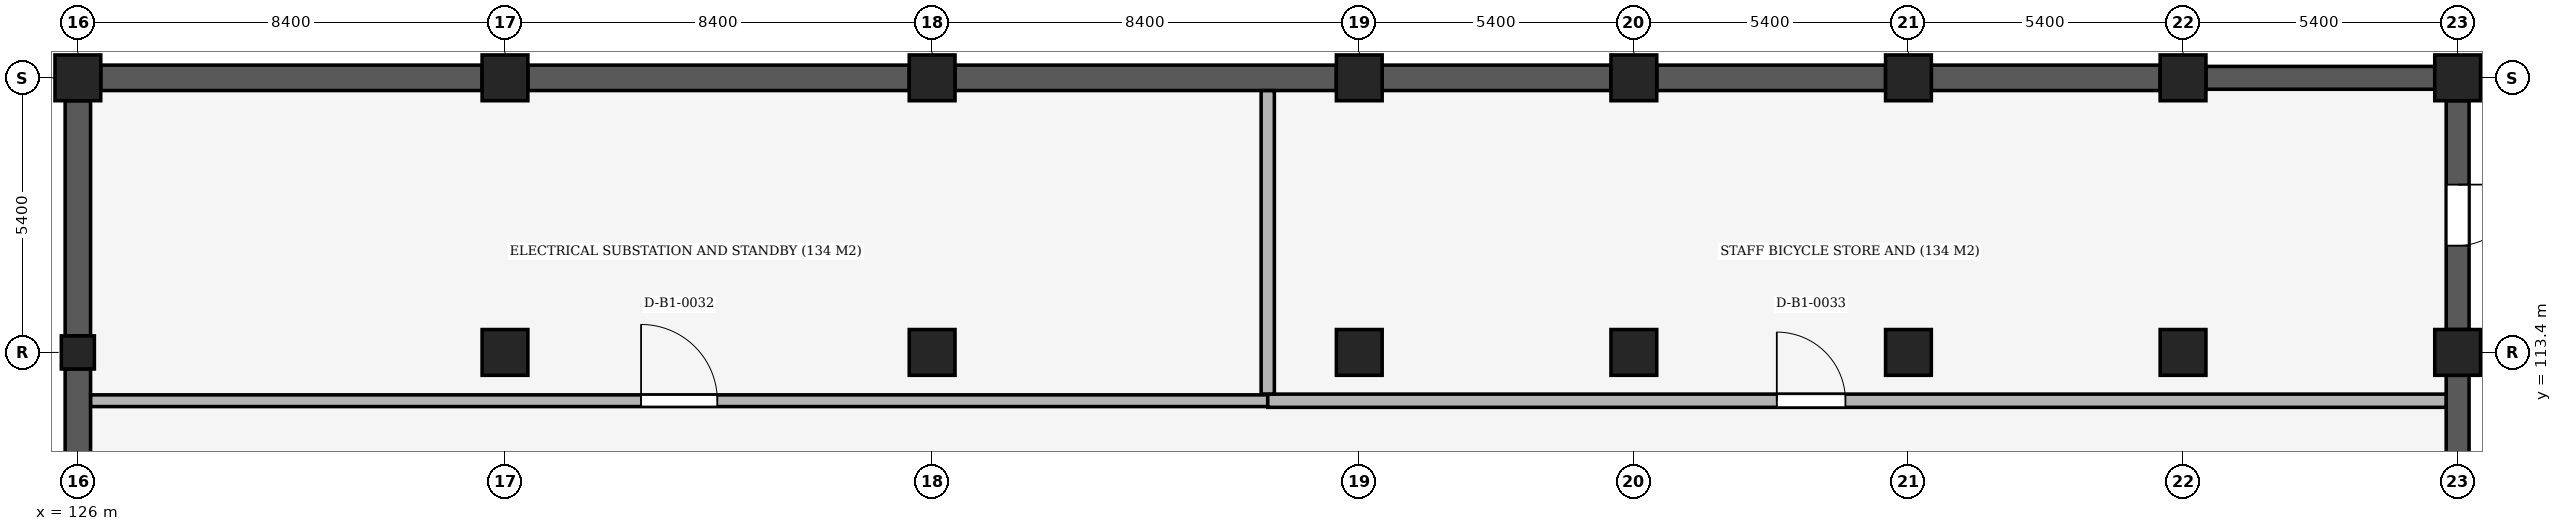
"""IFC4 building model, lengths in metres.
Left out: names, types, materials, properties, quantities, classifications, styles, units other than length and angle.
Written with IfcOpenShell. Run it as: python <this file> out.ifc"""

import sys

from ifc_helpers import new_model, si_unit, direction, frame, frame_2d, origin, origin_2d, place, context, subcontext, project, spatial, rectangle, extrude, element, fill, save


model = new_model("IFC4")
c1 = context("Model", 3, precision=1e-05, world=origin(), true_north=direction((0.0, 1.0)))
c2 = subcontext(c1, "Body", "Model", "MODEL_VIEW")
j1 = project(units=[si_unit("LENGTHUNIT", "METRE"), si_unit("PLANEANGLEUNIT", "RADIAN")], contexts=[c1])
p1 = place(None, origin())
s1 = spatial("IfcSite", under=j1, at=p1, CompositionType="ELEMENT")
p2 = place(p1, origin())
s2 = spatial("IfcBuilding", under=s1, at=p2, CompositionType="ELEMENT")
p3 = place(p2, frame((0.0, 0.0, -4.8)))
s3 = spatial("IfcBuildingStorey", under=s2, at=p3, CompositionType="ELEMENT", Elevation=-4.8)
p4 = place(p3, frame((126.0, 113.4, 0.0), z_axis=(0.0, 0.0, 1.0), x_axis=(1.0, 0.0, 0.0)))
e1 = element("IfcColumn", 1, at=p4, inside=s3, PredefinedType="COLUMN", context=c2, shape_type="SweptSolid", body=[
    extrude(rectangle(XDim=0.65, YDim=0.65, at=origin_2d()), origin(), (0.0, 0.0, 1.0), 4.8),
])
for number, where, z_axis, x_axis in (
    (2, (126.0, 118.8, 0.0), (0.0, 0.0, 1.0), (1.0, 0.0, 0.0)),
    (3, (134.4, 113.4, 0.0), (0.0, 0.0, 1.0), (1.0, 0.0, 0.0)),
    (4, (134.4, 118.8, 0.0), (0.0, 0.0, 1.0), (1.0, 0.0, 0.0)),
    (5, (142.8, 113.4, 0.0), (0.0, 0.0, 1.0), (1.0, 0.0, 0.0)),
    (6, (142.8, 118.8, 0.0), (0.0, 0.0, 1.0), (1.0, 0.0, 0.0)),
    (7, (151.2, 113.4, 0.0), (0.0, 0.0, 1.0), (1.0, 0.0, 0.0)),
    (8, (151.2, 118.8, 0.0), (0.0, 0.0, 1.0), (1.0, 0.0, 0.0)),
    (9, (156.6, 113.4, 0.0), (0.0, 0.0, 1.0), (1.0, 0.0, 0.0)),
    (10, (156.6, 118.8, 0.0), (0.0, 0.0, 1.0), (1.0, 0.0, 0.0)),
    (11, (162.0, 113.4, 0.0), (0.0, 0.0, 1.0), (1.0, 0.0, 0.0)),
    (12, (162.0, 118.8, 0.0), (0.0, 0.0, 1.0), (1.0, 0.0, 0.0)),
    (13, (167.4, 113.4, 0.0), (0.0, 0.0, 1.0), (1.0, 0.0, 0.0)),
    (14, (167.4, 118.8, 0.0), (0.0, 0.0, 1.0), (1.0, 0.0, 0.0)),
    (15, (172.8, 113.4, 0.0), (0.0, 0.0, 1.0), (1.0, 0.0, 0.0)),
    (16, (172.8, 118.8, 0.0), (0.0, 0.0, 1.0), (1.0, 0.0, 0.0)),
):
    element("IfcColumn", number, at=place(p3, frame(where, z_axis=z_axis, x_axis=x_axis)), inside=s3, PredefinedType="COLUMN", context=c2, shape_type="SweptSolid", body=[
        extrude(rectangle(XDim=0.9, YDim=0.9, at=origin_2d()), origin(), (0.0, 0.0, 1.0), 4.8),
    ])
p5 = place(p3, frame((126.0, 108.325, 0.0), z_axis=(0.0, 0.0, 1.0), x_axis=(0.0, 1.0, 0.0)))
e17 = element("IfcWall", 17, at=p5, inside=s3, PredefinedType="USERDEFINED", context=c2, shape_type="SweptSolid", body=[
    extrude(rectangle(XDim=4.75, YDim=0.5, at=frame_2d((2.375, 0.0))), origin(), (0.0, 0.0, 1.0), 3.85),
])
p6 = place(p3, frame((126.0, 113.725, 0.0), z_axis=(0.0, 0.0, 1.0), x_axis=(0.0, 1.0, 0.0)))
e18 = element("IfcWall", 18, at=p6, inside=s3, PredefinedType="USERDEFINED", context=c2, shape_type="SweptSolid", body=[
    extrude(rectangle(XDim=4.625, YDim=0.5, at=frame_2d((2.312, 0.0))), origin(), (0.0, 0.0, 1.0), 3.85),
])
for number, where, z_axis, x_axis in (
    (19, (126.45, 118.8, 0.0), (0.0, 0.0, 1.0), (1.0, 0.0, 0.0)),
    (20, (134.85, 118.8, 0.0), (0.0, 0.0, 1.0), (1.0, 0.0, 0.0)),
    (21, (143.25, 118.8, 0.0), (0.0, 0.0, 1.0), (1.0, 0.0, 0.0)),
):
    element("IfcWall", number, at=place(p3, frame(where, z_axis=z_axis, x_axis=x_axis)), inside=s3, PredefinedType="USERDEFINED", context=c2, shape_type="SweptSolid", body=[
        extrude(rectangle(XDim=7.5, YDim=0.5, at=frame_2d((3.75, 0.0))), origin(), (0.0, 0.0, 1.0), 3.8),
    ])
for number, where, z_axis, x_axis in (
    (22, (151.65, 118.8, 0.0), (0.0, 0.0, 1.0), (1.0, 0.0, 0.0)),
    (23, (157.05, 118.8, 0.0), (0.0, 0.0, 1.0), (1.0, 0.0, 0.0)),
    (24, (162.45, 118.8, 0.0), (0.0, 0.0, 1.0), (1.0, 0.0, 0.0)),
):
    element("IfcWall", number, at=place(p3, frame(where, z_axis=z_axis, x_axis=x_axis)), inside=s3, PredefinedType="USERDEFINED", context=c2, shape_type="SweptSolid", body=[
        extrude(rectangle(XDim=4.5, YDim=0.5, at=frame_2d((2.25, 0.0))), origin(), (0.0, 0.0, 1.0), 3.9),
    ])
p7 = place(p3, frame((167.85, 118.8, 0.0), z_axis=(0.0, 0.0, 1.0), x_axis=(1.0, 0.0, 0.0)))
e25 = element("IfcWall", 25, at=p7, inside=s3, PredefinedType="USERDEFINED", context=c2, shape_type="SweptSolid", body=[
    extrude(rectangle(XDim=4.5, YDim=0.45, at=frame_2d((2.25, 0.0))), origin(), (0.0, 0.0, 1.0), 3.9),
])
p8 = place(p3, frame((172.8, 118.35, 0.0), z_axis=(0.0, 0.0, 1.0), x_axis=(0.0, -1.0, 0.0)))
e26 = element("IfcWall", 26, at=p8, inside=s3, PredefinedType="USERDEFINED", context=c2, shape_type="SweptSolid", body=[
    extrude(rectangle(XDim=4.5, YDim=0.45, at=frame_2d((2.25, 0.0))), origin(), (0.0, 0.0, 1.0), 3.85),
])
p9 = place(p8, frame((1.65, 0.0, 0.0)))
e27 = element("IfcOpeningElement", 27, at=p9, cuts=e26, PredefinedType="OPENING", context=c2, shape_type="SweptSolid", body=[
    extrude(rectangle(XDim=1.2, YDim=2.2, at=frame_2d((0.6, 1.1))), frame((0.0, 0.24, 0.0), z_axis=(0.0, -1.0, 0.0), x_axis=(1.0, 0.0, 0.0)), (0.0, 0.0, 1.0), 0.48),
])
p10 = place(p3, frame((172.8, 112.95, 0.0), z_axis=(0.0, 0.0, 1.0), x_axis=(0.0, -1.0, 0.0)))
e28 = element("IfcWall", 28, at=p10, inside=s3, PredefinedType="USERDEFINED", context=c2, shape_type="SweptSolid", body=[
    extrude(rectangle(XDim=4.5, YDim=0.45, at=frame_2d((2.25, 0.0))), origin(), (0.0, 0.0, 1.0), 3.85),
])
p11 = place(p3, frame((126.252, 112.45, 0.0), z_axis=(0.0, 0.0, 1.0), x_axis=(1.0, 0.0, 0.0)))
e29 = element("IfcWall", 29, at=p11, inside=s3, PredefinedType="SOLIDWALL", context=c2, shape_type="SweptSolid", body=[
    extrude(rectangle(XDim=23.148, YDim=0.23, at=frame_2d((11.574, 0.0))), origin(), (0.0, 0.0, 1.0), 3.85),
])
p12 = place(p11, frame((10.824, 0.0, 0.0)))
e30 = element("IfcOpeningElement", 30, at=p12, cuts=e29, PredefinedType="OPENING", context=c2, shape_type="SweptSolid", body=[
    extrude(rectangle(XDim=1.5, YDim=2.2, at=frame_2d((0.75, 1.1))), frame((0.0, 0.13, 0.0), z_axis=(0.0, -1.0, 0.0), x_axis=(1.0, 0.0, 0.0)), (0.0, 0.0, 1.0), 0.26),
])
p13 = place(p3, frame((149.4, 112.45, 0.0), z_axis=(0.0, 0.0, 1.0), x_axis=(1.0, 0.0, 0.0)))
e31 = element("IfcWall", 31, at=p13, inside=s3, PredefinedType="PARTITIONING", context=c2, shape_type="SweptSolid", body=[
    extrude(rectangle(XDim=23.173, YDim=0.26, at=frame_2d((11.586, 0.0))), origin(), (0.0, 0.0, 1.0), 3.85),
])
p14 = place(p13, frame((10.011, 0.0, 0.0)))
e32 = element("IfcOpeningElement", 32, at=p14, cuts=e31, PredefinedType="OPENING", context=c2, shape_type="SweptSolid", body=[
    extrude(rectangle(XDim=1.35, YDim=2.2, at=frame_2d((0.675, 1.1))), frame((0.0, 0.145, 0.0), z_axis=(0.0, -1.0, 0.0), x_axis=(1.0, 0.0, 0.0)), (0.0, 0.0, 1.0), 0.29),
])
p15 = place(p3, frame((149.4, 112.582, 0.0), z_axis=(0.0, 0.0, 1.0), x_axis=(0.0, 1.0, 0.0)))
e33 = element("IfcWall", 33, at=p15, inside=s3, PredefinedType="PARTITIONING", context=c2, shape_type="SweptSolid", body=[
    extrude(rectangle(XDim=5.966, YDim=0.26, at=frame_2d((2.983, 0.0))), origin(), (0.0, 0.0, 1.0), 3.8),
])
p16 = place(p9, origin())
e34 = element("IfcDoor", 34, at=p16, inside=s3, OperationType="SINGLE_SWING_LEFT", PredefinedType="DOOR", context=c2, shape_type="SweptSolid", body=[
    extrude(rectangle(XDim=1.2, YDim=2.2, at=frame_2d((0.6, 1.1))), frame((0.0, 0.025, 0.0), z_axis=(0.0, -1.0, 0.0), x_axis=(1.0, 0.0, 0.0)), (0.0, 0.0, 1.0), 0.05),
])
fill(e27, e34)
p17 = place(p12, origin())
e35 = element("IfcDoor", 35, at=p17, inside=s3, OperationType="SINGLE_SWING_LEFT", PredefinedType="DOOR", context=c2, shape_type="SweptSolid", body=[
    extrude(rectangle(XDim=1.5, YDim=2.2, at=frame_2d((0.75, 1.1))), frame((0.0, 0.025, 0.0), z_axis=(0.0, -1.0, 0.0), x_axis=(1.0, 0.0, 0.0)), (0.0, 0.0, 1.0), 0.05),
])
fill(e30, e35)
p18 = place(p14, origin())
e36 = element("IfcDoor", 36, at=p18, inside=s3, OperationType="SINGLE_SWING_LEFT", PredefinedType="DOOR", context=c2, shape_type="SweptSolid", body=[
    extrude(rectangle(XDim=1.35, YDim=2.2, at=frame_2d((0.675, 1.1))), frame((0.0, 0.025, 0.0), z_axis=(0.0, -1.0, 0.0), x_axis=(1.0, 0.0, 0.0)), (0.0, 0.0, 1.0), 0.05),
])
fill(e32, e36)
save(model, sys.argv[1])
